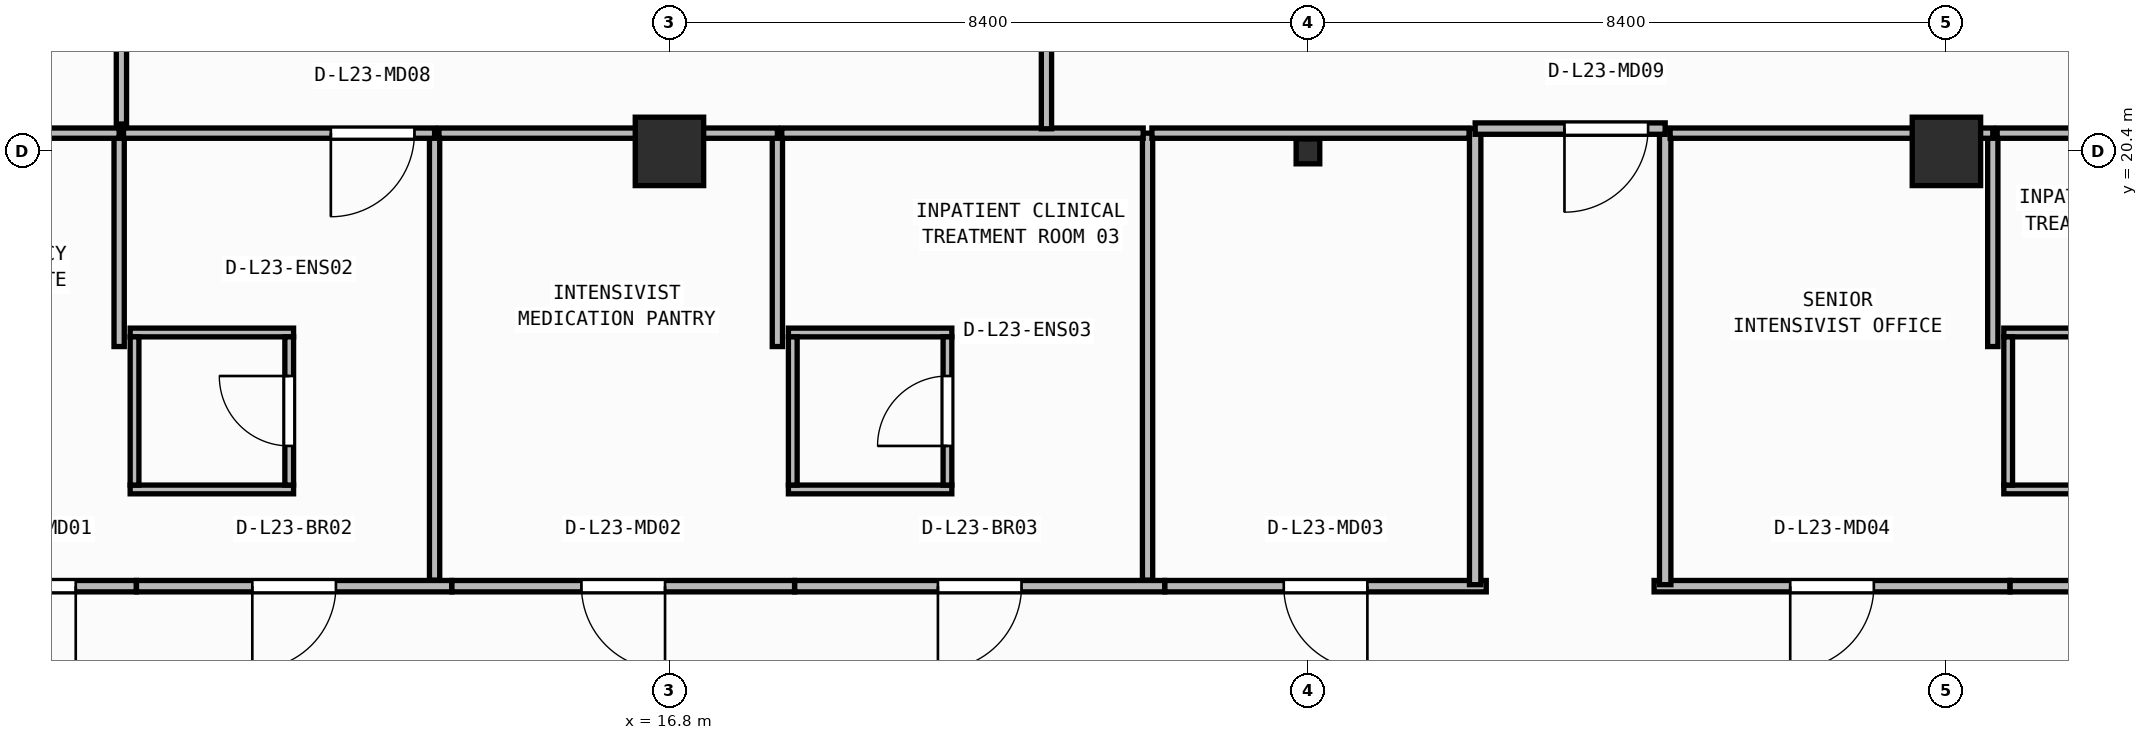
"""IFC4 building model, lengths in metres.
Left out: names, types, materials, properties, quantities, classifications, styles, units other than length and angle.
Written with IfcOpenShell. Run it as: python <this file> out.ifc"""

import sys

from ifc_helpers import new_model, si_unit, direction, frame, frame_2d, origin, origin_2d, place, context, subcontext, project, spatial, rectangle, i_section, extrude, element, fill, save


model = new_model("IFC4")
c1 = context("Model", 3, precision=1e-05, world=origin(), true_north=direction((0.0, 1.0)))
c2 = subcontext(c1, "Body", "Model", "MODEL_VIEW")
j1 = project(units=[si_unit("LENGTHUNIT", "METRE"), si_unit("PLANEANGLEUNIT", "RADIAN")], contexts=[c1])
p1 = place(None, origin())
s1 = spatial("IfcSite", under=j1, at=p1, CompositionType="ELEMENT")
p2 = place(p1, origin())
s2 = spatial("IfcBuilding", under=s1, at=p2, CompositionType="ELEMENT")
p3 = place(p2, frame((0.0, 0.0, 93.6)))
s3 = spatial("IfcBuildingStorey", under=s2, at=p3, CompositionType="ELEMENT", Elevation=93.6)
p4 = place(p3, frame((16.8, 20.4, 0.0), z_axis=(0.0, 0.0, 1.0), x_axis=(1.0, 0.0, 0.0)))
e1 = element("IfcColumn", 1, at=p4, inside=s3, PredefinedType="COLUMN", context=c2, shape_type="SweptSolid", body=[
    extrude(rectangle(XDim=0.9, YDim=0.9, at=origin_2d()), origin(), (0.0, 0.0, 1.0), 3.95),
])
p5 = place(p3, frame((25.2, 20.4, 0.0), z_axis=(0.0, 0.0, 1.0), x_axis=(1.0, 0.0, 0.0)))
e2 = element("IfcColumn", 2, at=p5, inside=s3, PredefinedType="COLUMN", context=c2, shape_type="SweptSolid", body=[
    extrude(i_section(OverallWidth=0.311, OverallDepth=0.327, WebThickness=0.016, FlangeThickness=0.025, FilletRadius=0.017, at=origin_2d()), origin(), (0.0, 0.0, 1.0), 3.95),
])
p6 = place(p3, frame((33.6, 20.4, 0.0), z_axis=(0.0, 0.0, 1.0), x_axis=(1.0, 0.0, 0.0)))
e3 = element("IfcColumn", 3, at=p6, inside=s3, PredefinedType="COLUMN", context=c2, shape_type="SweptSolid", body=[
    extrude(rectangle(XDim=0.9, YDim=0.9, at=origin_2d()), origin(), (0.0, 0.0, 1.0), 3.95),
])
for number, where, z_axis, x_axis in (
    (4, (9.705, 15.952, 0.0), (0.0, 0.0, 1.0), (1.0, 0.0, 0.0)),
    (5, (9.705, 18.018, 0.0), (0.0, 0.0, 1.0), (1.0, 0.0, 0.0)),
):
    element("IfcWall", number, at=place(p3, frame(where, z_axis=z_axis, x_axis=x_axis)), inside=s3, PredefinedType="PARTITIONING", context=c2, shape_type="SweptSolid", body=[
        extrude(rectangle(XDim=2.15, YDim=0.115, at=frame_2d((1.075, 0.0))), origin(), (0.0, 0.0, 1.0), 3.67),
    ])
p7 = place(p3, frame((9.762, 16.01, 0.0), z_axis=(0.0, 0.0, 1.0), x_axis=(0.0, 1.0, 0.0)))
e6 = element("IfcWall", 6, at=p7, inside=s3, PredefinedType="PARTITIONING", context=c2, shape_type="SweptSolid", body=[
    extrude(rectangle(XDim=1.95, YDim=0.115, at=frame_2d((0.975, 0.0))), origin(), (0.0, 0.0, 1.0), 3.67),
])
p8 = place(p3, frame((11.798, 16.01, 0.0), z_axis=(0.0, 0.0, 1.0), x_axis=(0.0, 1.0, 0.0)))
e7 = element("IfcWall", 7, at=p8, inside=s3, PredefinedType="PARTITIONING", context=c2, shape_type="SweptSolid", body=[
    extrude(rectangle(XDim=1.95, YDim=0.115, at=frame_2d((0.975, 0.0))), origin(), (0.0, 0.0, 1.0), 3.67),
])
p9 = place(p8, frame((0.515, 0.0, 0.0)))
e8 = element("IfcOpeningElement", 8, at=p9, cuts=e7, PredefinedType="OPENING", context=c2, shape_type="SweptSolid", body=[
    extrude(rectangle(XDim=0.92, YDim=2.1, at=frame_2d((0.46, 1.05))), frame((0.0, 0.067, 0.0), z_axis=(0.0, -1.0, 0.0), x_axis=(1.0, 0.0, 0.0)), (0.0, 0.0, 1.0), 0.135),
])
for number, where, z_axis, x_axis in (
    (9, (18.365, 15.952, 0.0), (0.0, 0.0, 1.0), (1.0, 0.0, 0.0)),
    (10, (18.365, 18.018, 0.0), (0.0, 0.0, 1.0), (1.0, 0.0, 0.0)),
):
    element("IfcWall", number, at=place(p3, frame(where, z_axis=z_axis, x_axis=x_axis)), inside=s3, PredefinedType="PARTITIONING", context=c2, shape_type="SweptSolid", body=[
        extrude(rectangle(XDim=2.15, YDim=0.115, at=frame_2d((1.075, 0.0))), origin(), (0.0, 0.0, 1.0), 3.67),
    ])
p10 = place(p3, frame((18.423, 16.01, 0.0), z_axis=(0.0, 0.0, 1.0), x_axis=(0.0, 1.0, 0.0)))
e11 = element("IfcWall", 11, at=p10, inside=s3, PredefinedType="PARTITIONING", context=c2, shape_type="SweptSolid", body=[
    extrude(rectangle(XDim=1.95, YDim=0.115, at=frame_2d((0.975, 0.0))), origin(), (0.0, 0.0, 1.0), 3.67),
])
p11 = place(p3, frame((20.458, 16.01, 0.0), z_axis=(0.0, 0.0, 1.0), x_axis=(0.0, 1.0, 0.0)))
e12 = element("IfcWall", 12, at=p11, inside=s3, PredefinedType="PARTITIONING", context=c2, shape_type="SweptSolid", body=[
    extrude(rectangle(XDim=1.95, YDim=0.115, at=frame_2d((0.975, 0.0))), origin(), (0.0, 0.0, 1.0), 3.67),
])
p12 = place(p11, frame((0.515, 0.0, 0.0)))
e13 = element("IfcOpeningElement", 13, at=p12, cuts=e12, PredefinedType="OPENING", context=c2, shape_type="SweptSolid", body=[
    extrude(rectangle(XDim=0.92, YDim=2.1, at=frame_2d((0.46, 1.05))), frame((0.0, 0.067, 0.0), z_axis=(0.0, -1.0, 0.0), x_axis=(1.0, 0.0, 0.0)), (0.0, 0.0, 1.0), 0.135),
])
p13 = place(p3, frame((34.355, 15.952, 0.0), z_axis=(0.0, 0.0, 1.0), x_axis=(1.0, 0.0, 0.0)))
e14 = element("IfcWall", 14, at=p13, inside=s3, PredefinedType="PARTITIONING", context=c2, shape_type="SweptSolid", body=[
    extrude(rectangle(XDim=2.15, YDim=0.115, at=frame_2d((1.075, 0.0))), origin(), (0.0, 0.0, 1.0), 3.438),
])
p14 = place(p3, frame((34.355, 18.018, 0.0), z_axis=(0.0, 0.0, 1.0), x_axis=(1.0, 0.0, 0.0)))
e15 = element("IfcWall", 15, at=p14, inside=s3, PredefinedType="PARTITIONING", context=c2, shape_type="SweptSolid", body=[
    extrude(rectangle(XDim=2.15, YDim=0.115, at=frame_2d((1.075, 0.0))), origin(), (0.0, 0.0, 1.0), 3.67),
])
p15 = place(p3, frame((34.413, 16.01, 0.0), z_axis=(0.0, 0.0, 1.0), x_axis=(0.0, 1.0, 0.0)))
e16 = element("IfcWall", 16, at=p15, inside=s3, PredefinedType="PARTITIONING", context=c2, shape_type="SweptSolid", body=[
    extrude(rectangle(XDim=1.95, YDim=0.115, at=frame_2d((0.975, 0.0))), origin(), (0.0, 0.0, 1.0), 3.67),
])
p16 = place(p3, frame((9.786, 14.68, 0.0), z_axis=(0.0, 0.0, 1.0), x_axis=(-1.0, 0.0, 0.0)))
e17 = element("IfcWall", 17, at=p16, inside=s3, PredefinedType="PARTITIONING", context=c2, shape_type="SweptSolid", body=[
    extrude(rectangle(XDim=2.694, YDim=0.15, at=frame_2d((1.347, 0.0))), origin(), (0.0, 0.0, 1.0), 3.67),
])
p17 = place(p16, frame((0.797, 0.0, 0.0)))
e18 = element("IfcOpeningElement", 18, at=p17, cuts=e17, PredefinedType="OPENING", context=c2, shape_type="SweptSolid", body=[
    extrude(rectangle(XDim=1.1, YDim=2.1, at=frame_2d((0.55, 1.05))), frame((0.0, 0.085, 0.0), z_axis=(0.0, -1.0, 0.0), x_axis=(1.0, 0.0, 0.0)), (0.0, 0.0, 1.0), 0.17),
])
p18 = place(p3, frame((13.936, 14.68, 0.0), z_axis=(0.0, 0.0, 1.0), x_axis=(-1.0, 0.0, 0.0)))
e19 = element("IfcWall", 19, at=p18, inside=s3, PredefinedType="PARTITIONING", context=c2, shape_type="SweptSolid", body=[
    extrude(rectangle(XDim=4.148, YDim=0.15, at=frame_2d((2.074, 0.0))), origin(), (0.0, 0.0, 1.0), 3.67),
])
p19 = place(p18, frame((1.524, 0.0, 0.0)))
e20 = element("IfcOpeningElement", 20, at=p19, cuts=e19, PredefinedType="OPENING", context=c2, shape_type="SweptSolid", body=[
    extrude(rectangle(XDim=1.1, YDim=2.1, at=frame_2d((0.55, 1.05))), frame((0.0, 0.085, 0.0), z_axis=(0.0, -1.0, 0.0), x_axis=(1.0, 0.0, 0.0)), (0.0, 0.0, 1.0), 0.17),
])
p20 = place(p3, frame((18.446, 14.68, 0.0), z_axis=(0.0, 0.0, 1.0), x_axis=(-1.0, 0.0, 0.0)))
e21 = element("IfcWall", 21, at=p20, inside=s3, PredefinedType="PARTITIONING", context=c2, shape_type="SweptSolid", body=[
    extrude(rectangle(XDim=4.508, YDim=0.15, at=frame_2d((2.254, 0.0))), origin(), (0.0, 0.0, 1.0), 3.67),
])
p21 = place(p20, frame((1.704, 0.0, 0.0)))
e22 = element("IfcOpeningElement", 22, at=p21, cuts=e21, PredefinedType="OPENING", context=c2, shape_type="SweptSolid", body=[
    extrude(rectangle(XDim=1.1, YDim=2.1, at=frame_2d((0.55, 1.05))), frame((0.0, 0.085, 0.0), z_axis=(0.0, -1.0, 0.0), x_axis=(1.0, 0.0, 0.0)), (0.0, 0.0, 1.0), 0.17),
])
p22 = place(p3, frame((23.316, 14.68, 0.0), z_axis=(0.0, 0.0, 1.0), x_axis=(-1.0, 0.0, 0.0)))
e23 = element("IfcWall", 23, at=p22, inside=s3, PredefinedType="PARTITIONING", context=c2, shape_type="SweptSolid", body=[
    extrude(rectangle(XDim=4.868, YDim=0.15, at=frame_2d((2.434, 0.0))), origin(), (0.0, 0.0, 1.0), 3.67),
])
p23 = place(p22, frame((1.884, 0.0, 0.0)))
e24 = element("IfcOpeningElement", 24, at=p23, cuts=e23, PredefinedType="OPENING", context=c2, shape_type="SweptSolid", body=[
    extrude(rectangle(XDim=1.1, YDim=2.1, at=frame_2d((0.55, 1.05))), frame((0.0, 0.085, 0.0), z_axis=(0.0, -1.0, 0.0), x_axis=(1.0, 0.0, 0.0)), (0.0, 0.0, 1.0), 0.17),
])
p24 = place(p3, frame((27.546, 14.68, 0.0), z_axis=(0.0, 0.0, 1.0), x_axis=(-1.0, 0.0, 0.0)))
e25 = element("IfcWall", 25, at=p24, inside=s3, PredefinedType="PARTITIONING", context=c2, shape_type="SweptSolid", body=[
    extrude(rectangle(XDim=4.228, YDim=0.15, at=frame_2d((2.114, 0.0))), origin(), (0.0, 0.0, 1.0), 3.67),
])
p25 = place(p24, frame((1.564, 0.0, 0.0)))
e26 = element("IfcOpeningElement", 26, at=p25, cuts=e25, PredefinedType="OPENING", context=c2, shape_type="SweptSolid", body=[
    extrude(rectangle(XDim=1.1, YDim=2.1, at=frame_2d((0.55, 1.05))), frame((0.0, 0.085, 0.0), z_axis=(0.0, -1.0, 0.0), x_axis=(1.0, 0.0, 0.0)), (0.0, 0.0, 1.0), 0.17),
])
p26 = place(p3, frame((34.436, 14.68, 0.0), z_axis=(0.0, 0.0, 1.0), x_axis=(-1.0, 0.0, 0.0)))
e27 = element("IfcWall", 27, at=p26, inside=s3, PredefinedType="PARTITIONING", context=c2, shape_type="SweptSolid", body=[
    extrude(rectangle(XDim=4.682, YDim=0.15, at=frame_2d((2.341, 0.0))), origin(), (0.0, 0.0, 1.0), 3.67),
])
p27 = place(p26, frame((1.791, 0.0, 0.0)))
e28 = element("IfcOpeningElement", 28, at=p27, cuts=e27, PredefinedType="OPENING", context=c2, shape_type="SweptSolid", body=[
    extrude(rectangle(XDim=1.1, YDim=2.1, at=frame_2d((0.55, 1.05))), frame((0.0, 0.085, 0.0), z_axis=(0.0, -1.0, 0.0), x_axis=(1.0, 0.0, 0.0)), (0.0, 0.0, 1.0), 0.17),
])
p28 = place(p3, frame((39.096, 14.68, 0.0), z_axis=(0.0, 0.0, 1.0), x_axis=(-1.0, 0.0, 0.0)))
e29 = element("IfcWall", 29, at=p28, inside=s3, PredefinedType="PARTITIONING", context=c2, shape_type="SweptSolid", body=[
    extrude(rectangle(XDim=4.658, YDim=0.15, at=frame_2d((2.329, 0.0))), origin(), (0.0, 0.0, 1.0), 3.67),
])
p29 = place(p28, frame((1.779, 0.0, 0.0)))
e30 = element("IfcOpeningElement", 30, at=p29, cuts=e29, PredefinedType="OPENING", context=c2, shape_type="SweptSolid", body=[
    extrude(rectangle(XDim=1.1, YDim=2.1, at=frame_2d((0.55, 1.05))), frame((0.0, 0.085, 0.0), z_axis=(0.0, -1.0, 0.0), x_axis=(1.0, 0.0, 0.0)), (0.0, 0.0, 1.0), 0.17),
])
for number, where, z_axis, x_axis in (
    (31, (27.4, 20.7, 0.0), (0.0, 0.0, 1.0), (0.0, -1.0, 0.0)),
    (32, (29.9, 14.7, 0.0), (0.0, 0.0, 1.0), (0.0, 1.0, 0.0)),
):
    element("IfcWall", number, at=place(p3, frame(where, z_axis=z_axis, x_axis=x_axis)), inside=s3, PredefinedType="PARTITIONING", context=c2, shape_type="SweptSolid", body=[
        extrude(rectangle(XDim=6.0, YDim=0.15, at=frame_2d((3.0, 0.0))), origin(), (0.0, 0.0, 1.0), 3.67),
    ])
p30 = place(p3, frame((29.9, 20.7, 0.0), z_axis=(0.0, 0.0, 1.0), x_axis=(-1.0, 0.0, 0.0)))
e33 = element("IfcWall", 33, at=p30, inside=s3, PredefinedType="PARTITIONING", context=c2, shape_type="SweptSolid", body=[
    extrude(rectangle(XDim=2.5, YDim=0.15, at=frame_2d((1.25, 0.0))), origin(), (0.0, 0.0, 1.0), 3.033),
])
p31 = place(p30, frame((0.225, 0.0, 0.0)))
e34 = element("IfcOpeningElement", 34, at=p31, cuts=e33, PredefinedType="OPENING", context=c2, shape_type="SweptSolid", body=[
    extrude(rectangle(XDim=1.1, YDim=2.1, at=frame_2d((0.55, 1.05))), frame((0.0, 0.085, 0.0), z_axis=(0.0, -1.0, 0.0), x_axis=(1.0, 0.0, 0.0)), (0.0, 0.0, 1.0), 0.17),
])
p32 = place(p3, frame((9.56, 17.833, 0.0), z_axis=(0.0, 0.0, 1.0), x_axis=(0.0, 1.0, 0.0)))
e35 = element("IfcWall", 35, at=p32, inside=s3, PredefinedType="PARTITIONING", context=c2, shape_type="SweptSolid", body=[
    extrude(rectangle(XDim=2.807, YDim=0.135, at=frame_2d((1.404, 0.0))), origin(), (0.0, 0.0, 1.0), 3.67),
])
p33 = place(p3, frame((9.56, 20.64, 0.0), z_axis=(0.0, 0.0, 1.0), x_axis=(-1.0, 0.0, 0.0)))
e36 = element("IfcWall", 36, at=p33, inside=s3, PredefinedType="PARTITIONING", context=c2, shape_type="SweptSolid", body=[
    extrude(rectangle(XDim=4.812, YDim=0.135, at=frame_2d((2.406, 0.0))), origin(), (0.0, 0.0, 1.0), 3.033),
])
p34 = place(p3, frame((13.71, 14.76, 0.0), z_axis=(0.0, 0.0, 1.0), x_axis=(0.0, 1.0, 0.0)))
e37 = element("IfcWall", 37, at=p34, inside=s3, PredefinedType="PARTITIONING", context=c2, shape_type="SweptSolid", body=[
    extrude(rectangle(XDim=5.88, YDim=0.135, at=frame_2d((2.94, 0.0))), origin(), (0.0, 0.0, 1.0), 3.67),
])
p35 = place(p3, frame((13.71, 20.64, 0.0), z_axis=(0.0, 0.0, 1.0), x_axis=(-1.0, 0.0, 0.0)))
e38 = element("IfcWall", 38, at=p35, inside=s3, PredefinedType="PARTITIONING", context=c2, shape_type="SweptSolid", body=[
    extrude(rectangle(XDim=4.093, YDim=0.135, at=frame_2d((2.046, 0.0))), origin(), (0.0, 0.0, 1.0), 3.033),
])
p36 = place(p35, frame((0.265, 0.0, 0.0)))
e39 = element("IfcOpeningElement", 39, at=p36, cuts=e38, PredefinedType="OPENING", context=c2, shape_type="SweptSolid", body=[
    extrude(rectangle(XDim=1.1, YDim=2.1, at=frame_2d((0.55, 1.05))), frame((0.0, 0.077, 0.0), z_axis=(0.0, -1.0, 0.0), x_axis=(1.0, 0.0, 0.0)), (0.0, 0.0, 1.0), 0.155),
])
p37 = place(p3, frame((18.22, 17.833, 0.0), z_axis=(0.0, 0.0, 1.0), x_axis=(0.0, 1.0, 0.0)))
e40 = element("IfcWall", 40, at=p37, inside=s3, PredefinedType="PARTITIONING", context=c2, shape_type="SweptSolid", body=[
    extrude(rectangle(XDim=2.807, YDim=0.135, at=frame_2d((1.404, 0.0))), origin(), (0.0, 0.0, 1.0), 3.67),
])
p38 = place(p3, frame((18.22, 20.64, 0.0), z_axis=(0.0, 0.0, 1.0), x_axis=(-1.0, 0.0, 0.0)))
e41 = element("IfcWall", 41, at=p38, inside=s3, PredefinedType="PARTITIONING", context=c2, shape_type="SweptSolid", body=[
    extrude(rectangle(XDim=4.452, YDim=0.135, at=frame_2d((2.226, 0.0))), origin(), (0.0, 0.0, 1.0), 3.033),
])
p39 = place(p3, frame((23.09, 14.76, 0.0), z_axis=(0.0, 0.0, 1.0), x_axis=(0.0, 1.0, 0.0)))
e42 = element("IfcWall", 42, at=p39, inside=s3, PredefinedType="PARTITIONING", context=c2, shape_type="SweptSolid", body=[
    extrude(rectangle(XDim=5.88, YDim=0.135, at=frame_2d((2.94, 0.0))), origin(), (0.0, 0.0, 1.0), 3.67),
])
p40 = place(p3, frame((23.032, 20.64, 0.0), z_axis=(0.0, 0.0, 1.0), x_axis=(-1.0, 0.0, 0.0)))
e43 = element("IfcWall", 43, at=p40, inside=s3, PredefinedType="PARTITIONING", context=c2, shape_type="SweptSolid", body=[
    extrude(rectangle(XDim=4.755, YDim=0.135, at=frame_2d((2.377, 0.0))), origin(), (0.0, 0.0, 1.0), 3.033),
])
p41 = place(p3, frame((27.32, 20.64, 0.0), z_axis=(0.0, 0.0, 1.0), x_axis=(-1.0, 0.0, 0.0)))
e44 = element("IfcWall", 44, at=p41, inside=s3, PredefinedType="PARTITIONING", context=c2, shape_type="SweptSolid", body=[
    extrude(rectangle(XDim=4.173, YDim=0.135, at=frame_2d((2.086, 0.0))), origin(), (0.0, 0.0, 1.0), 3.033),
])
p42 = place(p3, frame((34.21, 17.833, 0.0), z_axis=(0.0, 0.0, 1.0), x_axis=(0.0, 1.0, 0.0)))
e45 = element("IfcWall", 45, at=p42, inside=s3, PredefinedType="PARTITIONING", context=c2, shape_type="SweptSolid", body=[
    extrude(rectangle(XDim=2.807, YDim=0.135, at=frame_2d((1.404, 0.0))), origin(), (0.0, 0.0, 1.0), 3.67),
])
p43 = place(p3, frame((34.21, 20.64, 0.0), z_axis=(0.0, 0.0, 1.0), x_axis=(-1.0, 0.0, 0.0)))
e46 = element("IfcWall", 46, at=p43, inside=s3, PredefinedType="PARTITIONING", context=c2, shape_type="SweptSolid", body=[
    extrude(rectangle(XDim=4.245, YDim=0.135, at=frame_2d((2.123, 0.0))), origin(), (0.0, 0.0, 1.0), 3.033),
])
p44 = place(p3, frame((38.812, 20.64, 0.0), z_axis=(0.0, 0.0, 1.0), x_axis=(-1.0, 0.0, 0.0)))
e47 = element("IfcWall", 47, at=p44, inside=s3, PredefinedType="PARTITIONING", context=c2, shape_type="SweptSolid", body=[
    extrude(rectangle(XDim=4.545, YDim=0.135, at=frame_2d((2.272, 0.0))), origin(), (0.0, 0.0, 1.0), 3.033),
])
p45 = place(p3, frame((9.59, 20.76, 0.0), z_axis=(0.0, 0.0, 1.0), x_axis=(0.0, 1.0, 0.0)))
e48 = element("IfcWall", 48, at=p45, inside=s3, PredefinedType="PARTITIONING", context=c2, shape_type="SweptSolid", body=[
    extrude(rectangle(XDim=6.38, YDim=0.135, at=frame_2d((3.19, 0.0))), origin(), (0.0, 0.0, 1.0), 3.67),
])
p46 = place(p3, frame((21.76, 20.698, 0.0), z_axis=(0.0, 0.0, 1.0), x_axis=(0.0, 1.0, 0.0)))
e49 = element("IfcWall", 49, at=p46, inside=s3, PredefinedType="PARTITIONING", context=c2, shape_type="SweptSolid", body=[
    extrude(rectangle(XDim=6.442, YDim=0.135, at=frame_2d((3.221, 0.0))), origin(), (0.0, 0.0, 1.0), 3.67),
])
p47 = place(p9, origin())
e50 = element("IfcDoor", 50, at=p47, inside=s3, OperationType="SINGLE_SWING_RIGHT", PredefinedType="DOOR", context=c2, shape_type="SweptSolid", body=[
    extrude(rectangle(XDim=0.92, YDim=2.1, at=frame_2d((0.46, 1.05))), frame((0.0, 0.025, 0.0), z_axis=(0.0, -1.0, 0.0), x_axis=(1.0, 0.0, 0.0)), (0.0, 0.0, 1.0), 0.05),
])
fill(e8, e50)
p48 = place(p12, origin())
e51 = element("IfcDoor", 51, at=p48, inside=s3, OperationType="SINGLE_SWING_LEFT", PredefinedType="DOOR", context=c2, shape_type="SweptSolid", body=[
    extrude(rectangle(XDim=0.92, YDim=2.1, at=frame_2d((0.46, 1.05))), frame((0.0, 0.025, 0.0), z_axis=(0.0, -1.0, 0.0), x_axis=(1.0, 0.0, 0.0)), (0.0, 0.0, 1.0), 0.05),
])
fill(e13, e51)
p49 = place(p17, origin())
e52 = element("IfcDoor", 52, at=p49, inside=s3, OperationType="SINGLE_SWING_LEFT", PredefinedType="DOOR", context=c2, shape_type="SweptSolid", body=[
    extrude(rectangle(XDim=1.1, YDim=2.1, at=frame_2d((0.55, 1.05))), frame((0.0, 0.025, 0.0), z_axis=(0.0, -1.0, 0.0), x_axis=(1.0, 0.0, 0.0)), (0.0, 0.0, 1.0), 0.05),
])
fill(e18, e52)
p50 = place(p19, origin())
e53 = element("IfcDoor", 53, at=p50, inside=s3, OperationType="SINGLE_SWING_RIGHT", PredefinedType="DOOR", context=c2, shape_type="SweptSolid", body=[
    extrude(rectangle(XDim=1.1, YDim=2.1, at=frame_2d((0.55, 1.05))), frame((0.0, 0.025, 0.0), z_axis=(0.0, -1.0, 0.0), x_axis=(1.0, 0.0, 0.0)), (0.0, 0.0, 1.0), 0.05),
])
fill(e20, e53)
p51 = place(p21, origin())
e54 = element("IfcDoor", 54, at=p51, inside=s3, OperationType="SINGLE_SWING_LEFT", PredefinedType="DOOR", context=c2, shape_type="SweptSolid", body=[
    extrude(rectangle(XDim=1.1, YDim=2.1, at=frame_2d((0.55, 1.05))), frame((0.0, 0.025, 0.0), z_axis=(0.0, -1.0, 0.0), x_axis=(1.0, 0.0, 0.0)), (0.0, 0.0, 1.0), 0.05),
])
fill(e22, e54)
p52 = place(p23, origin())
e55 = element("IfcDoor", 55, at=p52, inside=s3, OperationType="SINGLE_SWING_RIGHT", PredefinedType="DOOR", context=c2, shape_type="SweptSolid", body=[
    extrude(rectangle(XDim=1.1, YDim=2.1, at=frame_2d((0.55, 1.05))), frame((0.0, 0.025, 0.0), z_axis=(0.0, -1.0, 0.0), x_axis=(1.0, 0.0, 0.0)), (0.0, 0.0, 1.0), 0.05),
])
fill(e24, e55)
p53 = place(p25, origin())
e56 = element("IfcDoor", 56, at=p53, inside=s3, OperationType="SINGLE_SWING_LEFT", PredefinedType="DOOR", context=c2, shape_type="SweptSolid", body=[
    extrude(rectangle(XDim=1.1, YDim=2.1, at=frame_2d((0.55, 1.05))), frame((0.0, 0.025, 0.0), z_axis=(0.0, -1.0, 0.0), x_axis=(1.0, 0.0, 0.0)), (0.0, 0.0, 1.0), 0.05),
])
fill(e26, e56)
p54 = place(p27, origin())
e57 = element("IfcDoor", 57, at=p54, inside=s3, OperationType="SINGLE_SWING_RIGHT", PredefinedType="DOOR", context=c2, shape_type="SweptSolid", body=[
    extrude(rectangle(XDim=1.1, YDim=2.1, at=frame_2d((0.55, 1.05))), frame((0.0, 0.025, 0.0), z_axis=(0.0, -1.0, 0.0), x_axis=(1.0, 0.0, 0.0)), (0.0, 0.0, 1.0), 0.05),
])
fill(e28, e57)
p55 = place(p31, origin())
e58 = element("IfcDoor", 58, at=p55, inside=s3, OperationType="SINGLE_SWING_RIGHT", PredefinedType="DOOR", context=c2, shape_type="SweptSolid", body=[
    extrude(rectangle(XDim=1.1, YDim=2.1, at=frame_2d((0.55, 1.05))), frame((0.0, 0.025, 0.0), z_axis=(0.0, -1.0, 0.0), x_axis=(1.0, 0.0, 0.0)), (0.0, 0.0, 1.0), 0.05),
])
fill(e34, e58)
p56 = place(p36, origin())
e59 = element("IfcDoor", 59, at=p56, inside=s3, OperationType="SINGLE_SWING_RIGHT", PredefinedType="DOOR", context=c2, shape_type="SweptSolid", body=[
    extrude(rectangle(XDim=1.1, YDim=2.1, at=frame_2d((0.55, 1.05))), frame((0.0, 0.025, 0.0), z_axis=(0.0, -1.0, 0.0), x_axis=(1.0, 0.0, 0.0)), (0.0, 0.0, 1.0), 0.05),
])
fill(e39, e59)
save(model, sys.argv[1])
